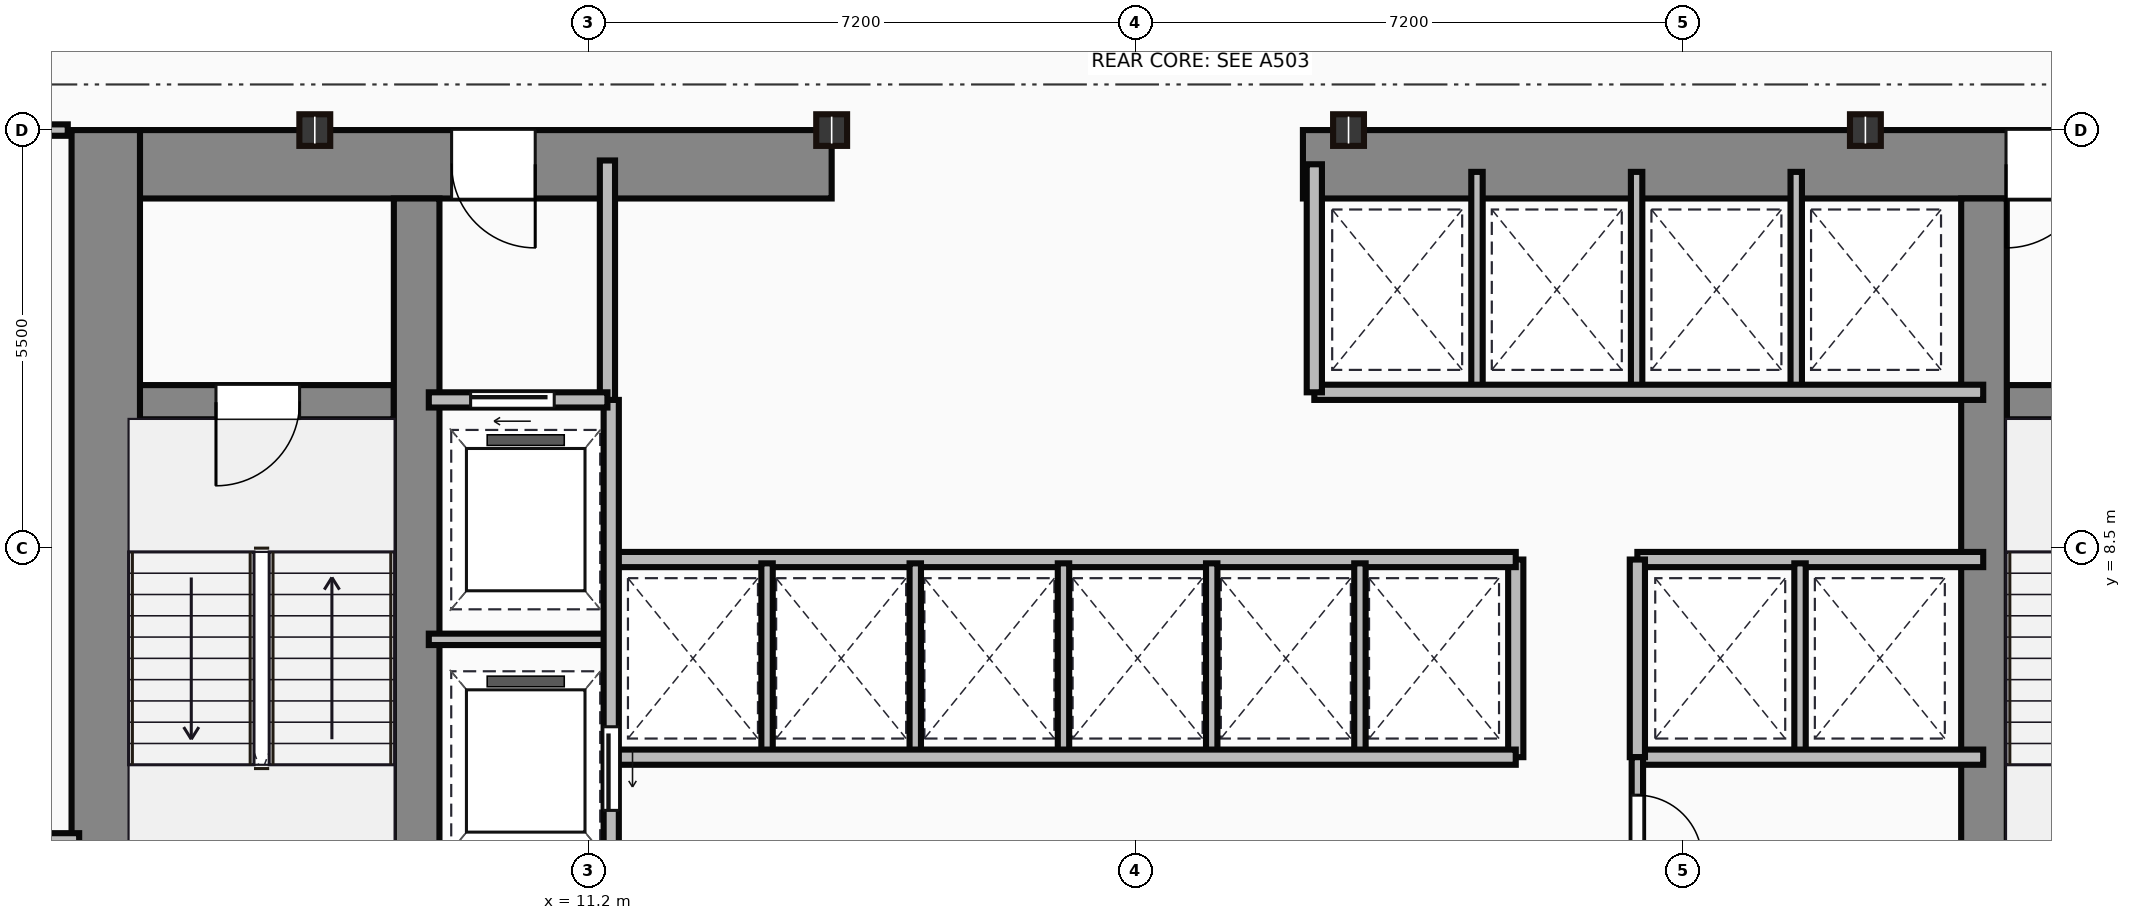
"""IFC4 building model, lengths in metres.
Left out: names, types, materials, properties, quantities, classifications, styles, units other than length and angle.
Written with IfcOpenShell. Run it as: python <this file> out.ifc"""

import sys

from ifc_helpers import new_model, si_unit, direction, frame, frame_2d, origin, origin_2d, place, context, subcontext, project, spatial, rectangle, i_section, extrude, source, transform, mapped, element, fill, save


model = new_model("IFC4")
c1 = context("Model", 3, precision=1e-05, world=origin(), true_north=direction((0.0, 1.0)))
c2 = subcontext(c1, "Body", "Model", "MODEL_VIEW")
j1 = project(units=[si_unit("LENGTHUNIT", "METRE"), si_unit("PLANEANGLEUNIT", "RADIAN")], contexts=[c1])
p1 = place(None, origin())
s1 = spatial("IfcSite", under=j1, at=p1, CompositionType="ELEMENT")
p2 = place(p1, origin())
s2 = spatial("IfcBuilding", under=s1, at=p2, CompositionType="ELEMENT")
p3 = place(p2, frame((0.0, 0.0, 69.0)))
s3 = spatial("IfcBuildingStorey", under=s2, at=p3, CompositionType="ELEMENT", Elevation=69.0)
m1 = source(origin(), c2, "Body", "SweptSolid", [
    extrude(rectangle(XDim=13.1, YDim=0.9, at=frame_2d((6.55, 0.0))), origin(), (0.0, 0.0, 1.0), 3.65),
])
p4 = place(p3, frame((4.85, 0.9, 0.0), z_axis=(0.0, 0.0, 1.0), x_axis=(0.0, 1.0, 0.0)))
e1 = element("IfcWall", 1, at=p4, inside=s3, PredefinedType="SHEAR", context=c2, shape_type="MappedRepresentation", body=[
    mapped(m1, transform((0.0, 0.0, 0.0))),
])
m2 = source(origin(), c2, "Body", "SweptSolid", [
    extrude(rectangle(XDim=9.1, YDim=0.9, at=frame_2d((4.55, 0.0))), origin(), (0.0, 0.0, 1.0), 3.65),
])
p5 = place(p3, frame((5.3, 13.55, 0.0), z_axis=(0.0, 0.0, 1.0), x_axis=(1.0, 0.0, 0.0)))
e2 = element("IfcWall", 2, at=p5, inside=s3, PredefinedType="SHEAR", context=c2, shape_type="MappedRepresentation", body=[
    mapped(m2, transform((0.0, 0.0, 0.0))),
])
p6 = place(p5, frame((4.1, 0.0, 0.0)))
e3 = element("IfcOpeningElement", 3, at=p6, cuts=e2, PredefinedType="OPENING", context=c2, shape_type="SweptSolid", body=[
    extrude(rectangle(XDim=1.1, YDim=2.15, at=frame_2d((0.55, 1.075))), frame((0.0, 0.46, 0.0), z_axis=(0.0, -1.0, 0.0), x_axis=(1.0, 0.0, 0.0)), (0.0, 0.0, 1.0), 0.92),
])
m3 = source(origin(), c2, "Body", "SweptSolid", [
    extrude(rectangle(XDim=12.6, YDim=0.9, at=frame_2d((6.3, 0.0))), origin(), (0.0, 0.0, 1.0), 3.65),
])
p7 = place(p3, frame((20.6, 13.55, 0.0), z_axis=(0.0, 0.0, 1.0), x_axis=(1.0, 0.0, 0.0)))
e4 = element("IfcWall", 4, at=p7, inside=s3, PredefinedType="SHEAR", context=c2, shape_type="MappedRepresentation", body=[
    mapped(m3, transform((0.0, 0.0, 0.0))),
])
p8 = place(p7, frame((9.25, 0.0, 0.0)))
e5 = element("IfcOpeningElement", 5, at=p8, cuts=e4, PredefinedType="OPENING", context=c2, shape_type="SweptSolid", body=[
    extrude(rectangle(XDim=1.1, YDim=2.15, at=frame_2d((0.55, 1.075))), frame((0.0, 0.46, 0.0), z_axis=(0.0, -1.0, 0.0), x_axis=(1.0, 0.0, 0.0)), (0.0, 0.0, 1.0), 0.92),
])
m4 = source(origin(), c2, "Body", "SweptSolid", [
    extrude(rectangle(XDim=12.2, YDim=0.6, at=frame_2d((6.1, 0.0))), origin(), (0.0, 0.0, 1.0), 3.65),
])
for number, where, z_axis, x_axis in (
    (6, (8.94, 0.9, 0.0), (0.0, 0.0, 1.0), (0.0, 1.0, 0.0)),
    (7, (29.56, 0.9, 0.0), (0.0, 0.0, 1.0), (0.0, 1.0, 0.0)),
):
    element("IfcWall", number, at=place(p3, frame(where, z_axis=z_axis, x_axis=x_axis)), inside=s3, PredefinedType="SHEAR", context=c2, shape_type="MappedRepresentation", body=[
        mapped(m4, transform((0.0, 0.0, 0.0))),
    ])
m5 = source(origin(), c2, "Body", "SweptSolid", [
    extrude(rectangle(XDim=3.39, YDim=0.45, at=frame_2d((1.695, 0.0))), origin(), (0.0, 0.0, 1.0), 3.65),
])
p9 = place(p3, frame((5.25, 10.42, 0.0), z_axis=(0.0, 0.0, 1.0), x_axis=(1.0, 0.0, 0.0)))
e8 = element("IfcWall", 8, at=p9, inside=s3, PredefinedType="SHEAR", context=c2, shape_type="MappedRepresentation", body=[
    mapped(m5, transform((0.0, 0.0, 0.0))),
])
p10 = place(p9, frame((1.05, 0.0, 0.0)))
e9 = element("IfcOpeningElement", 9, at=p10, cuts=e8, PredefinedType="OPENING", context=c2, shape_type="SweptSolid", body=[
    extrude(rectangle(XDim=1.1, YDim=2.15, at=frame_2d((0.55, 1.075))), frame((0.0, 0.235, 0.0), z_axis=(0.0, -1.0, 0.0), x_axis=(1.0, 0.0, 0.0)), (0.0, 0.0, 1.0), 0.47),
])
p11 = place(p3, frame((29.86, 10.42, 0.0), z_axis=(0.0, 0.0, 1.0), x_axis=(1.0, 0.0, 0.0)))
e10 = element("IfcWall", 10, at=p11, inside=s3, PredefinedType="SHEAR", context=c2, shape_type="MappedRepresentation", body=[
    mapped(m5, transform((0.0, 0.0, 0.0))),
])
p12 = place(p11, frame((1.1, 0.0, 0.0)))
e11 = element("IfcOpeningElement", 11, at=p12, cuts=e10, PredefinedType="OPENING", context=c2, shape_type="SweptSolid", body=[
    extrude(rectangle(XDim=1.1, YDim=2.15, at=frame_2d((0.55, 1.075))), frame((0.0, 0.235, 0.0), z_axis=(0.0, -1.0, 0.0), x_axis=(1.0, 0.0, 0.0)), (0.0, 0.0, 1.0), 0.47),
])
m6 = source(origin(), c2, "Body", "SweptSolid", [
    extrude(i_section(OverallWidth=0.406, OverallDepth=0.416, WebThickness=0.03, FlangeThickness=0.048, at=origin_2d()), origin(), (0.0, 0.0, 1.0), 3.65),
])
for number, where, z_axis, x_axis in (
    (12, (7.6, 14.0, 0.0), (0.0, 0.0, 1.0), (1.0, 0.0, 0.0)),
    (13, (14.4, 14.0, 0.0), (0.0, 0.0, 1.0), (1.0, 0.0, 0.0)),
    (14, (21.2, 14.0, 0.0), (0.0, 0.0, 1.0), (1.0, 0.0, 0.0)),
    (15, (28.0, 14.0, 0.0), (0.0, 0.0, 1.0), (1.0, 0.0, 0.0)),
):
    element("IfcColumn", number, at=place(p3, frame(where, z_axis=z_axis, x_axis=x_axis)), inside=s3, PredefinedType="COLUMN", context=c2, shape_type="MappedRepresentation", body=[
        mapped(m6, transform((0.0, 0.0, 0.0))),
    ])
m7 = source(origin(), c2, "Body", "SweptSolid", [
    extrude(rectangle(XDim=4.5, YDim=0.25, at=frame_2d((2.25, 0.0))), origin(), (0.0, 0.0, 1.0), 3.4),
])
p13 = place(p3, frame((0.0, 4.625, 0.0), z_axis=(0.0, 0.0, 1.0), x_axis=(1.0, 0.0, 0.0)))
e16 = element("IfcWall", 16, at=p13, inside=s3, PredefinedType="STANDARD", context=c2, shape_type="MappedRepresentation", body=[
    mapped(m7, transform((0.0, 0.0, 0.0))),
])
m8 = source(origin(), c2, "Body", "SweptSolid", [
    extrude(rectangle(XDim=3.18, YDim=0.2, at=frame_2d((1.59, 0.0))), origin(), (0.0, 0.0, 1.0), 3.4),
])
p14 = place(p3, frame((11.45, 10.42, 0.0), z_axis=(0.0, 0.0, 1.0), x_axis=(0.0, 1.0, 0.0)))
e17 = element("IfcWall", 17, at=p14, inside=s3, PredefinedType="PARTITIONING", context=c2, shape_type="MappedRepresentation", body=[
    mapped(m8, transform((0.0, 0.0, 0.0))),
])
m9 = source(origin(), c2, "Body", "SweptSolid", [
    extrude(rectangle(XDim=2.35, YDim=0.2, at=frame_2d((1.175, 0.0))), origin(), (0.0, 0.0, 1.0), 3.4),
])
p15 = place(p3, frame((9.1, 10.45, 0.0), z_axis=(0.0, 0.0, 1.0), x_axis=(1.0, 0.0, 0.0)))
e18 = element("IfcWall", 18, at=p15, inside=s3, PredefinedType="PARTITIONING", context=c2, shape_type="MappedRepresentation", body=[
    mapped(m9, transform((0.0, 0.0, 0.0))),
])
p16 = place(p15, frame((0.55, 0.0, 0.0)))
e19 = element("IfcOpeningElement", 19, at=p16, cuts=e18, PredefinedType="OPENING", context=c2, shape_type="SweptSolid", body=[
    extrude(rectangle(XDim=1.1, YDim=2.15, at=frame_2d((0.55, 1.075))), frame((0.0, 0.11, 0.0), z_axis=(0.0, -1.0, 0.0), x_axis=(1.0, 0.0, 0.0)), (0.0, 0.0, 1.0), 0.22),
])
m10 = source(origin(), c2, "Body", "SweptSolid", [
    extrude(rectangle(XDim=9.6, YDim=0.2, at=frame_2d((4.8, 0.0))), origin(), (0.0, 0.0, 1.0), 3.4),
])
p17 = place(p3, frame((11.5, 0.85, 0.0), z_axis=(0.0, 0.0, 1.0), x_axis=(0.0, 1.0, 0.0)))
e20 = element("IfcWall", 20, at=p17, inside=s3, PredefinedType="PARTITIONING", context=c2, shape_type="MappedRepresentation", body=[
    mapped(m10, transform((0.0, 0.0, 0.0))),
])
p18 = place(p17, frame((4.2, 0.0, 0.0)))
e21 = element("IfcOpeningElement", 21, at=p18, cuts=e20, PredefinedType="OPENING", context=c2, shape_type="SweptSolid", body=[
    extrude(rectangle(XDim=1.1, YDim=2.15, at=frame_2d((0.55, 1.075))), frame((0.0, 0.11, 0.0), z_axis=(0.0, -1.0, 0.0), x_axis=(1.0, 0.0, 0.0)), (0.0, 0.0, 1.0), 0.22),
])
p19 = place(p17, frame((0.9, 0.0, 0.0)))
e22 = element("IfcOpeningElement", 22, at=p19, cuts=e20, PredefinedType="OPENING", context=c2, shape_type="SweptSolid", body=[
    extrude(rectangle(XDim=1.2, YDim=2.15, at=frame_2d((0.6, 1.075))), frame((0.0, 0.11, 0.0), z_axis=(0.0, -1.0, 0.0), x_axis=(1.0, 0.0, 0.0)), (0.0, 0.0, 1.0), 0.22),
])
m11 = source(origin(), c2, "Body", "SweptSolid", [
    extrude(rectangle(XDim=2.4, YDim=0.15, at=frame_2d((1.2, 0.0))), origin(), (0.0, 0.0, 1.0), 3.4),
])
p20 = place(p3, frame((9.1, 7.3, 0.0), z_axis=(0.0, 0.0, 1.0), x_axis=(1.0, 0.0, 0.0)))
e23 = element("IfcWall", 23, at=p20, inside=s3, PredefinedType="PARTITIONING", context=c2, shape_type="MappedRepresentation", body=[
    mapped(m11, transform((0.0, 0.0, 0.0))),
])
m12 = source(origin(), c2, "Body", "SweptSolid", [
    extrude(rectangle(XDim=11.85, YDim=0.2, at=frame_2d((5.925, 0.0))), origin(), (0.0, 0.0, 1.0), 3.4),
])
for number, where, z_axis, x_axis in (
    (24, (11.55, 5.75, 0.0), (0.0, 0.0, 1.0), (1.0, 0.0, 0.0)),
    (25, (11.55, 8.35, 0.0), (0.0, 0.0, 1.0), (1.0, 0.0, 0.0)),
):
    element("IfcWall", number, at=place(p3, frame(where, z_axis=z_axis, x_axis=x_axis)), inside=s3, PredefinedType="PARTITIONING", context=c2, shape_type="MappedRepresentation", body=[
        mapped(m12, transform((0.0, 0.0, 0.0))),
    ])
m13 = source(origin(), c2, "Body", "SweptSolid", [
    extrude(rectangle(XDim=2.6, YDim=0.2, at=frame_2d((1.3, 0.0))), origin(), (0.0, 0.0, 1.0), 3.4),
])
p21 = place(p3, frame((23.4, 5.75, 0.0), z_axis=(0.0, 0.0, 1.0), x_axis=(0.0, 1.0, 0.0)))
e26 = element("IfcWall", 26, at=p21, inside=s3, PredefinedType="PARTITIONING", context=c2, shape_type="MappedRepresentation", body=[
    mapped(m13, transform((0.0, 0.0, 0.0))),
])
m14 = source(origin(), c2, "Body", "SweptSolid", [
    extrude(rectangle(XDim=2.5, YDim=0.15, at=frame_2d((1.25, 0.0))), origin(), (0.0, 0.0, 1.0), 3.4),
])
for number, where, z_axis, x_axis in (
    (27, (13.55, 5.8, 0.0), (0.0, 0.0, 1.0), (0.0, 1.0, 0.0)),
    (28, (15.5, 5.8, 0.0), (0.0, 0.0, 1.0), (0.0, 1.0, 0.0)),
    (29, (17.45, 5.8, 0.0), (0.0, 0.0, 1.0), (0.0, 1.0, 0.0)),
    (30, (19.4, 5.8, 0.0), (0.0, 0.0, 1.0), (0.0, 1.0, 0.0)),
    (31, (21.35, 5.8, 0.0), (0.0, 0.0, 1.0), (0.0, 1.0, 0.0)),
):
    element("IfcWall", number, at=place(p3, frame(where, z_axis=z_axis, x_axis=x_axis)), inside=s3, PredefinedType="PARTITIONING", context=c2, shape_type="MappedRepresentation", body=[
        mapped(m14, transform((0.0, 0.0, 0.0))),
    ])
m15 = source(origin(), c2, "Body", "SweptSolid", [
    extrude(rectangle(XDim=8.8, YDim=0.2, at=frame_2d((4.4, 0.0))), origin(), (0.0, 0.0, 1.0), 3.4),
])
p22 = place(p3, frame((20.75, 10.55, 0.0), z_axis=(0.0, 0.0, 1.0), x_axis=(1.0, 0.0, 0.0)))
e32 = element("IfcWall", 32, at=p22, inside=s3, PredefinedType="PARTITIONING", context=c2, shape_type="MappedRepresentation", body=[
    mapped(m15, transform((0.0, 0.0, 0.0))),
])
m16 = source(origin(), c2, "Body", "SweptSolid", [
    extrude(rectangle(XDim=3.0, YDim=0.2, at=frame_2d((1.5, 0.0))), origin(), (0.0, 0.0, 1.0), 3.4),
])
p23 = place(p3, frame((20.75, 10.55, 0.0), z_axis=(0.0, 0.0, 1.0), x_axis=(0.0, 1.0, 0.0)))
e33 = element("IfcWall", 33, at=p23, inside=s3, PredefinedType="PARTITIONING", context=c2, shape_type="MappedRepresentation", body=[
    mapped(m16, transform((0.0, 0.0, 0.0))),
])
m17 = source(origin(), c2, "Body", "SweptSolid", [
    extrude(rectangle(XDim=2.85, YDim=0.15, at=frame_2d((1.425, 0.0))), origin(), (0.0, 0.0, 1.0), 3.4),
])
for number, where, z_axis, x_axis in (
    (34, (22.89, 10.6, 0.0), (0.0, 0.0, 1.0), (0.0, 1.0, 0.0)),
    (35, (24.99, 10.6, 0.0), (0.0, 0.0, 1.0), (0.0, 1.0, 0.0)),
    (36, (27.09, 10.6, 0.0), (0.0, 0.0, 1.0), (0.0, 1.0, 0.0)),
):
    element("IfcWall", number, at=place(p3, frame(where, z_axis=z_axis, x_axis=x_axis)), inside=s3, PredefinedType="PARTITIONING", context=c2, shape_type="MappedRepresentation", body=[
        mapped(m17, transform((0.0, 0.0, 0.0))),
    ])
m18 = source(origin(), c2, "Body", "SweptSolid", [
    extrude(rectangle(XDim=4.55, YDim=0.2, at=frame_2d((2.275, 0.0))), origin(), (0.0, 0.0, 1.0), 3.4),
])
for number, where, z_axis, x_axis in (
    (37, (25.0, 8.35, 0.0), (0.0, 0.0, 1.0), (1.0, 0.0, 0.0)),
    (38, (25.0, 5.75, 0.0), (0.0, 0.0, 1.0), (1.0, 0.0, 0.0)),
):
    element("IfcWall", number, at=place(p3, frame(where, z_axis=z_axis, x_axis=x_axis)), inside=s3, PredefinedType="PARTITIONING", context=c2, shape_type="MappedRepresentation", body=[
        mapped(m18, transform((0.0, 0.0, 0.0))),
    ])
p24 = place(p3, frame((25.0, 5.75, 0.0), z_axis=(0.0, 0.0, 1.0), x_axis=(0.0, 1.0, 0.0)))
e39 = element("IfcWall", 39, at=p24, inside=s3, PredefinedType="PARTITIONING", context=c2, shape_type="MappedRepresentation", body=[
    mapped(m13, transform((0.0, 0.0, 0.0))),
])
p25 = place(p3, frame((27.14, 5.8, 0.0), z_axis=(0.0, 0.0, 1.0), x_axis=(0.0, 1.0, 0.0)))
e40 = element("IfcWall", 40, at=p25, inside=s3, PredefinedType="PARTITIONING", context=c2, shape_type="MappedRepresentation", body=[
    mapped(m14, transform((0.0, 0.0, 0.0))),
])
m19 = source(origin(), c2, "Body", "SweptSolid", [
    extrude(rectangle(XDim=4.9, YDim=0.15, at=frame_2d((2.45, 0.0))), origin(), (0.0, 0.0, 1.0), 3.4),
])
p26 = place(p3, frame((25.0, 0.85, 0.0), z_axis=(0.0, 0.0, 1.0), x_axis=(0.0, 1.0, 0.0)))
e41 = element("IfcWall", 41, at=p26, inside=s3, PredefinedType="PARTITIONING", context=c2, shape_type="MappedRepresentation", body=[
    mapped(m19, transform((0.0, 0.0, 0.0))),
])
p27 = place(p26, frame((1.85, 0.0, 0.0)))
e42 = element("IfcOpeningElement", 42, at=p27, cuts=e41, PredefinedType="OPENING", context=c2, shape_type="SweptSolid", body=[
    extrude(rectangle(XDim=0.95, YDim=2.15, at=frame_2d((0.475, 1.075))), frame((0.0, 0.085, 0.0), z_axis=(0.0, -1.0, 0.0), x_axis=(1.0, 0.0, 0.0)), (0.0, 0.0, 1.0), 0.17),
])
p28 = place(p26, frame((3.55, 0.0, 0.0)))
e43 = element("IfcOpeningElement", 43, at=p28, cuts=e41, PredefinedType="OPENING", context=c2, shape_type="SweptSolid", body=[
    extrude(rectangle(XDim=0.85, YDim=2.15, at=frame_2d((0.425, 1.075))), frame((0.0, 0.085, 0.0), z_axis=(0.0, -1.0, 0.0), x_axis=(1.0, 0.0, 0.0)), (0.0, 0.0, 1.0), 0.17),
])
m20 = source(origin(), c2, "Body", "SweptSolid", [
    extrude(rectangle(XDim=0.95, YDim=0.15, at=frame_2d((0.475, 0.0))), origin(), (0.0, 0.0, 1.0), 2.625),
])
p29 = place(p3, frame((4.35, 14.0, 0.0), z_axis=(0.0, 0.0, 1.0), x_axis=(-1.0, 0.0, 0.0)))
e44 = element("IfcWall", 44, at=p29, inside=s3, PredefinedType="PARTITIONING", context=c2, shape_type="MappedRepresentation", body=[
    mapped(m20, transform((0.0, 0.0, 0.0))),
])
m21 = source(origin(), c2, "Body", "SweptSolid", [
    extrude(rectangle(XDim=1.1, YDim=2.15, at=frame_2d((0.55, 1.075))), frame((0.0, 0.025, 0.0), z_axis=(0.0, -1.0, 0.0), x_axis=(1.0, 0.0, 0.0)), (0.0, 0.0, 1.0), 0.05),
])
p30 = place(p10, frame((1.1, 0.0, 0.0), z_axis=(0.0, 0.0, 1.0), x_axis=(-1.0, 0.0, 0.0)))
e45 = element("IfcDoor", 45, at=p30, inside=s3, OperationType="SINGLE_SWING_LEFT", PredefinedType="DOOR", context=c2, shape_type="MappedRepresentation", body=[
    mapped(m21, transform((0.0, 0.0, 0.0))),
])
fill(e9, e45)
p31 = place(p6, origin())
e46 = element("IfcDoor", 46, at=p31, inside=s3, OperationType="SINGLE_SWING_RIGHT", PredefinedType="DOOR", context=c2, shape_type="MappedRepresentation", body=[
    mapped(m21, transform((0.0, 0.0, 0.0))),
])
fill(e3, e46)
p32 = place(p8, origin())
e47 = element("IfcDoor", 47, at=p32, inside=s3, OperationType="SINGLE_SWING_LEFT", PredefinedType="DOOR", context=c2, shape_type="MappedRepresentation", body=[
    mapped(m21, transform((0.0, 0.0, 0.0))),
])
fill(e5, e47)
p33 = place(p16, origin())
e48 = element("IfcDoor", 48, at=p33, inside=s3, OperationType="SLIDING_TO_LEFT", PredefinedType="DOOR", context=c2, shape_type="MappedRepresentation", body=[
    mapped(m21, transform((0.0, 0.0, 0.0))),
])
fill(e19, e48)
p34 = place(p18, frame((1.1, 0.0, 0.0), z_axis=(0.0, 0.0, 1.0), x_axis=(-1.0, 0.0, 0.0)))
e49 = element("IfcDoor", 49, at=p34, inside=s3, OperationType="SLIDING_TO_LEFT", PredefinedType="DOOR", context=c2, shape_type="MappedRepresentation", body=[
    mapped(m21, transform((0.0, 0.0, 0.0))),
])
fill(e21, e49)
m22 = source(origin(), c2, "Body", "SweptSolid", [
    extrude(rectangle(XDim=0.85, YDim=2.15, at=frame_2d((0.425, 1.075))), frame((0.0, 0.025, 0.0), z_axis=(0.0, -1.0, 0.0), x_axis=(1.0, 0.0, 0.0)), (0.0, 0.0, 1.0), 0.05),
])
p35 = place(p28, origin())
e50 = element("IfcDoor", 50, at=p35, inside=s3, OperationType="SINGLE_SWING_LEFT", PredefinedType="DOOR", context=c2, shape_type="MappedRepresentation", body=[
    mapped(m22, transform((0.0, 0.0, 0.0))),
])
fill(e43, e50)
save(model, sys.argv[1])
